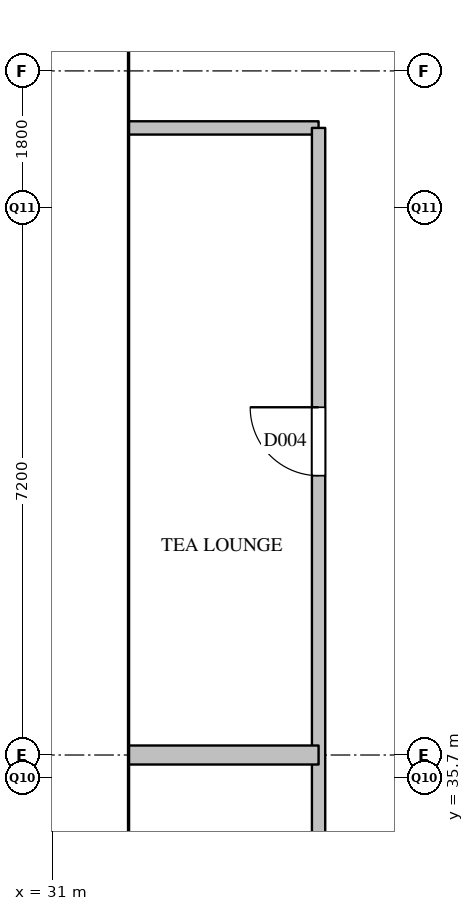
"""IFC4 building model, lengths in metres.
Left out: names, types, materials, properties, quantities, classifications, styles, units other than length and angle.
Written with IfcOpenShell. Run it as: python <this file> out.ifc"""

import sys

from ifc_helpers import new_model, si_unit, direction, frame, frame_2d, origin, place, context, subcontext, project, spatial, rectangle, extrude, element, fill, save


model = new_model("IFC4")
c1 = context("Model", 3, precision=1e-05, world=origin(), true_north=direction((0.0, 1.0)))
c2 = subcontext(c1, "Body", "Model", "MODEL_VIEW")
j1 = project(units=[si_unit("LENGTHUNIT", "METRE"), si_unit("PLANEANGLEUNIT", "RADIAN")], contexts=[c1])
p1 = place(None, origin())
s1 = spatial("IfcSite", under=j1, at=p1, CompositionType="ELEMENT")
p2 = place(p1, origin())
s2 = spatial("IfcBuilding", under=s1, at=p2, CompositionType="ELEMENT")
p3 = place(p2, frame((0.0, 0.0, 218.9)))
s3 = spatial("IfcBuildingStorey", under=s2, at=p3, CompositionType="ELEMENT", Elevation=218.9)
p4 = place(p3, frame((32.0, 44.25, 0.0), z_axis=(0.0, 0.0, 1.0), x_axis=(1.0, 0.0, 0.0)))
e1 = element("IfcWall", 1, at=p4, inside=s3, PredefinedType="PARTITIONING", context=c2, shape_type="SweptSolid", body=[
    extrude(rectangle(XDim=2.5, YDim=0.175, at=frame_2d((1.25, 0.0))), origin(), (0.0, 0.0, 1.0), 3.6),
])
p5 = place(p3, frame((34.5, 28.5, 0.0), z_axis=(0.0, 0.0, 1.0), x_axis=(0.0, 1.0, 0.0)))
e2 = element("IfcWall", 2, at=p5, inside=s3, PredefinedType="PARTITIONING", context=c2, shape_type="SweptSolid", body=[
    extrude(rectangle(XDim=15.75, YDim=0.175, at=frame_2d((7.875, 0.0))), origin(), (0.0, 0.0, 1.0), 3.6),
])
p6 = place(p5, frame((3.3, 0.0, 0.0)))
e3 = element("IfcOpeningElement", 3, at=p6, cuts=e2, PredefinedType="OPENING", context=c2, shape_type="SweptSolid", body=[
    extrude(rectangle(XDim=0.9, YDim=2.1, at=frame_2d((0.45, 1.05))), frame((0.0, 0.097, 0.0), z_axis=(0.0, -1.0, 0.0), x_axis=(1.0, 0.0, 0.0)), (0.0, 0.0, 1.0), 0.195),
])
p7 = place(p5, frame((11.175, 0.0, 0.0)))
e4 = element("IfcOpeningElement", 4, at=p7, cuts=e2, PredefinedType="OPENING", context=c2, shape_type="SweptSolid", body=[
    extrude(rectangle(XDim=0.9, YDim=2.1, at=frame_2d((0.45, 1.05))), frame((0.0, 0.097, 0.0), z_axis=(0.0, -1.0, 0.0), x_axis=(1.0, 0.0, 0.0)), (0.0, 0.0, 1.0), 0.195),
])
p8 = place(p3, frame((32.0, 36.0, 0.0), z_axis=(0.0, 0.0, 1.0), x_axis=(1.0, 0.0, 0.0)))
e5 = element("IfcWall", 5, at=p8, inside=s3, PredefinedType="PARTITIONING", context=c2, shape_type="SweptSolid", body=[
    extrude(rectangle(XDim=2.5, YDim=0.25, at=frame_2d((1.25, 0.0))), origin(), (0.0, 0.0, 1.0), 3.6),
])
p9 = place(p7, origin())
e6 = element("IfcDoor", 6, at=p9, inside=s3, OperationType="SINGLE_SWING_RIGHT", PredefinedType="DOOR", context=c2, shape_type="SweptSolid", body=[
    extrude(rectangle(XDim=0.9, YDim=2.1, at=frame_2d((0.45, 1.05))), frame((0.0, 0.025, 0.0), z_axis=(0.0, -1.0, 0.0), x_axis=(1.0, 0.0, 0.0)), (0.0, 0.0, 1.0), 0.05),
])
fill(e4, e6)
save(model, sys.argv[1])
